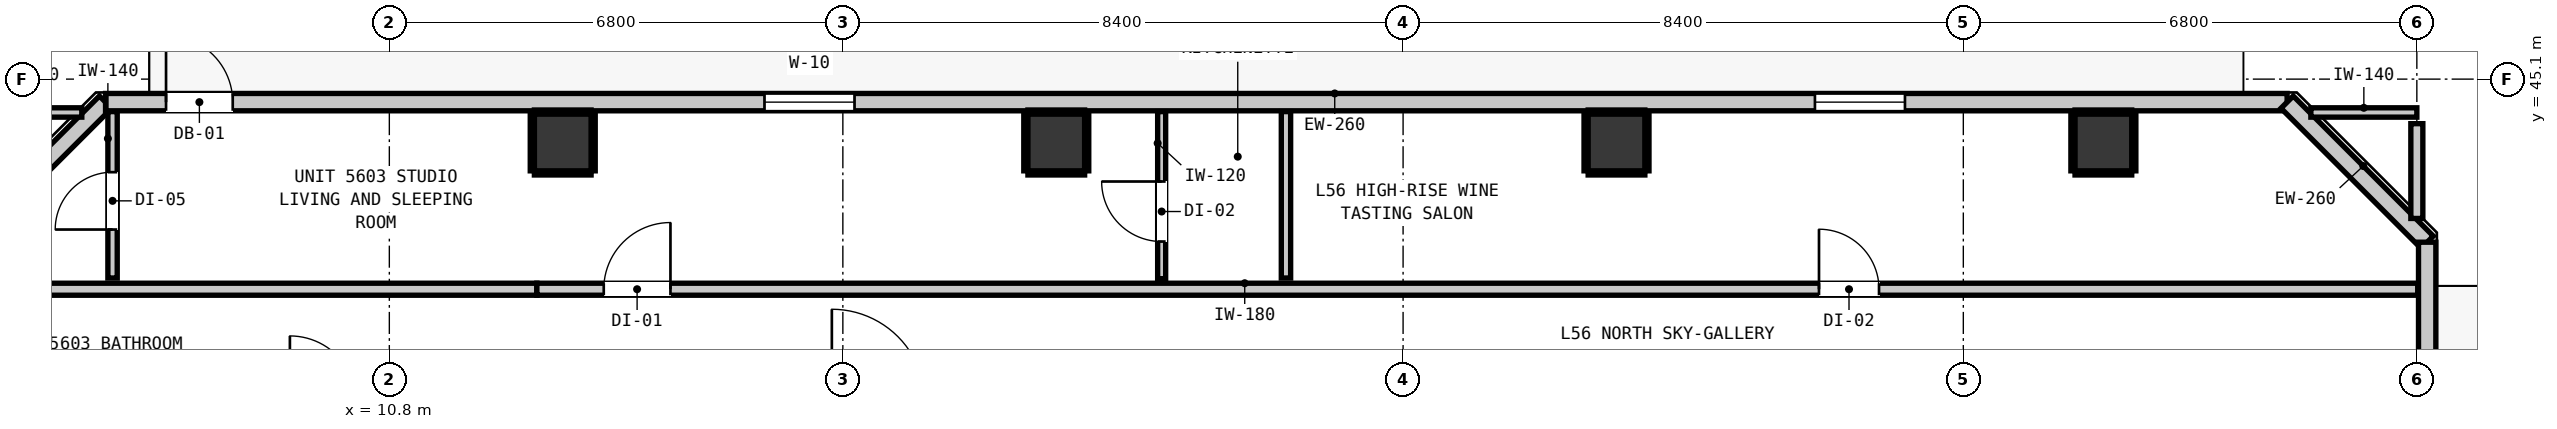
"""IFC4 building model, lengths in metres.
Left out: names, types, materials, properties, quantities, classifications, styles, units other than length and angle.
Written with IfcOpenShell. Run it as: python <this file> out.ifc"""

import sys

from ifc_helpers import new_model, si_unit, direction, frame, frame_2d, origin, origin_2d, place, context, subcontext, project, spatial, rectangle, extrude, element, fill, save


model = new_model("IFC4")
c1 = context("Model", 3, precision=1e-05, world=origin(), true_north=direction((0.0, 1.0)))
c2 = subcontext(c1, "Body", "Model", "MODEL_VIEW")
j1 = project(units=[si_unit("LENGTHUNIT", "METRE"), si_unit("PLANEANGLEUNIT", "RADIAN")], contexts=[c1])
p1 = place(None, origin())
s1 = spatial("IfcSite", under=j1, at=p1, CompositionType="ELEMENT")
p2 = place(p1, origin())
s2 = spatial("IfcBuilding", under=s1, at=p2, CompositionType="ELEMENT")
p3 = place(p2, frame((0.0, 0.0, 193.48)))
s3 = spatial("IfcBuildingStorey", under=s2, at=p3, CompositionType="ELEMENT", Elevation=193.48)
for number, where, z_axis, x_axis in (
    (1, (13.4, 44.15, 0.0), (0.0, 0.0, 1.0), (1.0, 0.0, 0.0)),
    (2, (20.8, 44.15, 0.0), (0.0, 0.0, 1.0), (1.0, 0.0, 0.0)),
    (3, (29.2, 44.15, 0.0), (0.0, 0.0, 1.0), (1.0, 0.0, 0.0)),
    (4, (36.5, 44.15, 0.0), (0.0, 0.0, 1.0), (1.0, 0.0, 0.0)),
):
    element("IfcColumn", number, at=place(p3, frame(where, z_axis=z_axis, x_axis=x_axis)), inside=s3, PredefinedType="COLUMN", context=c2, shape_type="SweptSolid", body=[
        extrude(rectangle(XDim=0.85, YDim=0.85, at=origin_2d()), origin(), (0.0, 0.0, 1.0), 3.32),
    ])
p4 = place(p3, frame((4.445, 42.655, 0.0), z_axis=(0.0, 0.0, 1.0), x_axis=(0.707106781187, 0.707106781187, 0.0)))
e5 = element("IfcWall", 5, at=p4, inside=s3, PredefinedType="STANDARD", context=c2, shape_type="SweptSolid", body=[
    extrude(rectangle(XDim=2.97, YDim=0.26, at=frame_2d((1.485, 0.0))), origin(), (0.0, 0.0, 1.0), 3.1),
])
p5 = place(p3, frame((6.545, 44.755, 0.0), z_axis=(0.0, 0.0, 1.0), x_axis=(1.0, 0.0, 0.0)))
e6 = element("IfcWall", 6, at=p5, inside=s3, PredefinedType="STANDARD", context=c2, shape_type="SweptSolid", body=[
    extrude(rectangle(XDim=32.71, YDim=0.26, at=frame_2d((16.355, 0.0))), origin(), (0.0, 0.0, 1.0), 3.1),
])
p6 = place(p5, frame((0.907, 0.0, 0.0)))
e7 = element("IfcOpeningElement", 7, at=p6, cuts=e6, PredefinedType="OPENING", context=c2, shape_type="SweptSolid", body=[
    extrude(rectangle(XDim=1.0, YDim=2.15, at=frame_2d((0.5, 1.075))), frame((0.0, 0.14, 0.0), z_axis=(0.0, -1.0, 0.0), x_axis=(1.0, 0.0, 0.0)), (0.0, 0.0, 1.0), 0.28),
])
p7 = place(p5, frame((9.88, 0.0, 0.85)))
e8 = element("IfcOpeningElement", 8, at=p7, cuts=e6, PredefinedType="OPENING", context=c2, shape_type="SweptSolid", body=[
    extrude(rectangle(XDim=1.35, YDim=1.85, at=frame_2d((0.675, 0.925))), frame((0.0, 0.14, 0.0), z_axis=(0.0, -1.0, 0.0), x_axis=(1.0, 0.0, 0.0)), (0.0, 0.0, 1.0), 0.28),
])
p8 = place(p5, frame((25.63, 0.0, 0.85)))
e9 = element("IfcOpeningElement", 9, at=p8, cuts=e6, PredefinedType="OPENING", context=c2, shape_type="SweptSolid", body=[
    extrude(rectangle(XDim=1.35, YDim=1.85, at=frame_2d((0.675, 0.925))), frame((0.0, 0.14, 0.0), z_axis=(0.0, -1.0, 0.0), x_axis=(1.0, 0.0, 0.0)), (0.0, 0.0, 1.0), 0.28),
])
p9 = place(p3, frame((39.255, 44.755, 0.0), z_axis=(0.0, 0.0, 1.0), x_axis=(0.707147883682, -0.707065676302, 0.0)))
e10 = element("IfcWall", 10, at=p9, inside=s3, PredefinedType="STANDARD", context=c2, shape_type="SweptSolid", body=[
    extrude(rectangle(XDim=2.97, YDim=0.26, at=frame_2d((1.485, 0.0))), origin(), (0.0, 0.0, 1.0), 3.1),
])
p10 = place(p3, frame((41.355, 42.655, 0.0), z_axis=(0.0, 0.0, 1.0), x_axis=(0.0, -1.0, 0.0)))
e11 = element("IfcWall", 11, at=p10, inside=s3, PredefinedType="STANDARD", context=c2, shape_type="SweptSolid", body=[
    extrude(rectangle(XDim=30.31, YDim=0.26, at=frame_2d((15.155, 0.0))), origin(), (0.0, 0.0, 1.0), 3.1),
])
p11 = place(p10, frame((23.818, 0.0, 0.0)))
e12 = element("IfcOpeningElement", 12, at=p11, cuts=e11, PredefinedType="OPENING", context=c2, shape_type="SweptSolid", body=[
    extrude(rectangle(XDim=1.0, YDim=2.15, at=frame_2d((0.5, 1.075))), frame((0.0, 0.14, 0.0), z_axis=(0.0, -1.0, 0.0), x_axis=(1.0, 0.0, 0.0)), (0.0, 0.0, 1.0), 0.28),
])
p12 = place(p10, frame((25.332, 0.0, 0.85)))
e13 = element("IfcOpeningElement", 13, at=p12, cuts=e11, PredefinedType="OPENING", context=c2, shape_type="SweptSolid", body=[
    extrude(rectangle(XDim=1.35, YDim=1.85, at=frame_2d((0.675, 0.925))), frame((0.0, 0.14, 0.0), z_axis=(0.0, -1.0, 0.0), x_axis=(1.0, 0.0, 0.0)), (0.0, 0.0, 1.0), 0.28),
])
p13 = place(p10, frame((28.033, 0.0, 0.85)))
e14 = element("IfcOpeningElement", 14, at=p13, cuts=e11, PredefinedType="OPENING", context=c2, shape_type="SweptSolid", body=[
    extrude(rectangle(XDim=1.35, YDim=1.85, at=frame_2d((0.675, 0.925))), frame((0.0, 0.14, 0.0), z_axis=(0.0, -1.0, 0.0), x_axis=(1.0, 0.0, 0.0)), (0.0, 0.0, 1.0), 0.28),
])
p14 = place(p3, frame((5.388, 41.95, 0.0), z_axis=(0.0, 0.0, 1.0), x_axis=(1.0, 0.0, 0.0)))
e15 = element("IfcWall", 15, at=p14, inside=s3, PredefinedType="PARTITIONING", context=c2, shape_type="SweptSolid", body=[
    extrude(rectangle(XDim=7.624, YDim=0.18, at=frame_2d((3.812, 0.0))), origin(), (0.0, 0.0, 1.0), 2.477),
])
p15 = place(p3, frame((13.012, 41.95, 0.0), z_axis=(0.0, 0.0, 1.0), x_axis=(1.0, 0.0, 0.0)))
e16 = element("IfcWall", 16, at=p15, inside=s3, PredefinedType="PARTITIONING", context=c2, shape_type="SweptSolid", body=[
    extrude(rectangle(XDim=28.201, YDim=0.18, at=frame_2d((14.101, 0.0))), origin(), (0.0, 0.0, 1.0), 3.1),
])
p16 = place(p15, frame((1.003, 0.0, 0.0)))
e17 = element("IfcOpeningElement", 17, at=p16, cuts=e16, PredefinedType="OPENING", context=c2, shape_type="SweptSolid", body=[
    extrude(rectangle(XDim=1.0, YDim=2.15, at=frame_2d((0.5, 1.075))), frame((0.0, 0.1, 0.0), z_axis=(0.0, -1.0, 0.0), x_axis=(1.0, 0.0, 0.0)), (0.0, 0.0, 1.0), 0.2),
])
p17 = place(p15, frame((19.224, 0.0, 0.0)))
e18 = element("IfcOpeningElement", 18, at=p17, cuts=e16, PredefinedType="OPENING", context=c2, shape_type="SweptSolid", body=[
    extrude(rectangle(XDim=0.9, YDim=2.1, at=frame_2d((0.45, 1.05))), frame((0.0, 0.1, 0.0), z_axis=(0.0, -1.0, 0.0), x_axis=(1.0, 0.0, 0.0)), (0.0, 0.0, 1.0), 0.2),
])
for number, where, z_axis, x_axis in (
    (19, (4.6, 44.6, 0.0), (0.0, 0.0, 1.0), (1.0, 0.0, 0.0)),
    (20, (39.611, 44.6, 0.0), (0.0, 0.0, 1.0), (1.0, 0.0, 0.0)),
):
    element("IfcWall", number, at=place(p3, frame(where, z_axis=z_axis, x_axis=x_axis)), inside=s3, PredefinedType="PARTITIONING", context=c2, shape_type="SweptSolid", body=[
        extrude(rectangle(XDim=1.589, YDim=0.14, at=frame_2d((0.794, 0.0))), origin(), (0.0, 0.0, 1.0), 3.1),
    ])
p18 = place(p3, frame((41.2, 43.011, 0.0), z_axis=(0.0, 0.0, 1.0), x_axis=(0.0, 1.0, 0.0)))
e21 = element("IfcWall", 21, at=p18, inside=s3, PredefinedType="PARTITIONING", context=c2, shape_type="SweptSolid", body=[
    extrude(rectangle(XDim=1.421, YDim=0.18, at=frame_2d((0.71, 0.0))), origin(), (0.0, 0.0, 1.0), 3.1),
])
p19 = place(p3, frame((6.65, 42.118, 0.0), z_axis=(0.0, 0.0, 1.0), x_axis=(0.0, 1.0, 0.0)))
e22 = element("IfcWall", 22, at=p19, inside=s3, PredefinedType="PARTITIONING", context=c2, shape_type="SweptSolid", body=[
    extrude(rectangle(XDim=2.495, YDim=0.14, at=frame_2d((1.248, 0.0))), origin(), (0.0, 0.0, 1.0), 3.1),
])
p20 = place(p19, frame((0.727, 0.0, 0.0)))
e23 = element("IfcOpeningElement", 23, at=p20, cuts=e22, PredefinedType="OPENING", context=c2, shape_type="SweptSolid", body=[
    extrude(rectangle(XDim=0.86, YDim=2.02, at=frame_2d((0.43, 1.01))), frame((0.0, 0.08, 0.0), z_axis=(0.0, -1.0, 0.0), x_axis=(1.0, 0.0, 0.0)), (0.0, 0.0, 1.0), 0.16),
])
p21 = place(p3, frame((24.244, 42.118, 0.0), z_axis=(0.0, 0.0, 1.0), x_axis=(0.0, 1.0, 0.0)))
e24 = element("IfcWall", 24, at=p21, inside=s3, PredefinedType="PARTITIONING", context=c2, shape_type="SweptSolid", body=[
    extrude(rectangle(XDim=2.495, YDim=0.14, at=frame_2d((1.248, 0.0))), origin(), (0.0, 0.0, 1.0), 3.1),
])
p22 = place(p3, frame((22.38, 42.108, 0.0), z_axis=(0.0, 0.0, 1.0), x_axis=(0.0, 1.0, 0.0)))
e25 = element("IfcWall", 25, at=p22, inside=s3, PredefinedType="PARTITIONING", context=c2, shape_type="SweptSolid", body=[
    extrude(rectangle(XDim=2.505, YDim=0.12, at=frame_2d((1.252, 0.0))), origin(), (0.0, 0.0, 1.0), 3.1),
])
p23 = place(p22, frame((0.557, 0.0, 0.0)))
e26 = element("IfcOpeningElement", 26, at=p23, cuts=e25, PredefinedType="OPENING", context=c2, shape_type="SweptSolid", body=[
    extrude(rectangle(XDim=0.9, YDim=2.1, at=frame_2d((0.45, 1.05))), frame((0.0, 0.07, 0.0), z_axis=(0.0, -1.0, 0.0), x_axis=(1.0, 0.0, 0.0)), (0.0, 0.0, 1.0), 0.14),
])
for number, where, z_axis, x_axis in (
    (27, (12.975, 43.693, 0.0), (0.0, 0.0, 1.0), (1.0, 0.0, 0.0)),
    (28, (12.975, 44.607, 0.0), (0.0, 0.0, 1.0), (1.0, 0.0, 0.0)),
    (29, (12.943, 43.725, 0.0), (0.0, 0.0, 1.0), (0.0, 1.0, 0.0)),
    (30, (13.857, 43.725, 0.0), (0.0, 0.0, 1.0), (0.0, 1.0, 0.0)),
):
    element("IfcWall", number, at=place(p3, frame(where, z_axis=z_axis, x_axis=x_axis)), inside=s3, PredefinedType="PARTITIONING", context=c2, shape_type="SweptSolid", body=[
        extrude(rectangle(XDim=0.85, YDim=0.06, at=frame_2d((0.425, 0.0))), origin(), (0.0, 0.0, 1.0), 1.45),
    ])
for number, where, z_axis, x_axis in (
    (31, (20.375, 43.693, 0.0), (0.0, 0.0, 1.0), (1.0, 0.0, 0.0)),
    (32, (20.375, 44.607, 0.0), (0.0, 0.0, 1.0), (1.0, 0.0, 0.0)),
):
    element("IfcWall", number, at=place(p3, frame(where, z_axis=z_axis, x_axis=x_axis)), inside=s3, PredefinedType="PARTITIONING", context=c2, shape_type="SweptSolid", body=[
        extrude(rectangle(XDim=0.85, YDim=0.06, at=frame_2d((0.425, 0.0))), origin(), (0.0, 0.0, 1.0), 1.45),
    ])
for number, where, z_axis, x_axis in (
    (33, (20.343, 43.725, 0.0), (0.0, 0.0, 1.0), (0.0, 1.0, 0.0)),
    (34, (21.257, 43.725, 0.0), (0.0, 0.0, 1.0), (0.0, 1.0, 0.0)),
):
    element("IfcWall", number, at=place(p3, frame(where, z_axis=z_axis, x_axis=x_axis)), inside=s3, PredefinedType="PARTITIONING", context=c2, shape_type="SweptSolid", body=[
        extrude(rectangle(XDim=0.85, YDim=0.06, at=frame_2d((0.425, 0.0))), origin(), (0.0, 0.0, 1.0), 1.45),
    ])
for number, where, z_axis, x_axis in (
    (35, (28.775, 43.693, 0.0), (0.0, 0.0, 1.0), (1.0, 0.0, 0.0)),
    (36, (28.775, 44.607, 0.0), (0.0, 0.0, 1.0), (1.0, 0.0, 0.0)),
):
    element("IfcWall", number, at=place(p3, frame(where, z_axis=z_axis, x_axis=x_axis)), inside=s3, PredefinedType="PARTITIONING", context=c2, shape_type="SweptSolid", body=[
        extrude(rectangle(XDim=0.85, YDim=0.06, at=frame_2d((0.425, 0.0))), origin(), (0.0, 0.0, 1.0), 1.45),
    ])
for number, where, z_axis, x_axis in (
    (37, (28.743, 43.725, 0.0), (0.0, 0.0, 1.0), (0.0, 1.0, 0.0)),
    (38, (29.657, 43.725, 0.0), (0.0, 0.0, 1.0), (0.0, 1.0, 0.0)),
):
    element("IfcWall", number, at=place(p3, frame(where, z_axis=z_axis, x_axis=x_axis)), inside=s3, PredefinedType="PARTITIONING", context=c2, shape_type="SweptSolid", body=[
        extrude(rectangle(XDim=0.85, YDim=0.06, at=frame_2d((0.425, 0.0))), origin(), (0.0, 0.0, 1.0), 1.45),
    ])
for number, where, z_axis, x_axis in (
    (39, (36.075, 43.693, 0.0), (0.0, 0.0, 1.0), (1.0, 0.0, 0.0)),
    (40, (36.075, 44.607, 0.0), (0.0, 0.0, 1.0), (1.0, 0.0, 0.0)),
):
    element("IfcWall", number, at=place(p3, frame(where, z_axis=z_axis, x_axis=x_axis)), inside=s3, PredefinedType="PARTITIONING", context=c2, shape_type="SweptSolid", body=[
        extrude(rectangle(XDim=0.85, YDim=0.06, at=frame_2d((0.425, 0.0))), origin(), (0.0, 0.0, 1.0), 1.45),
    ])
for number, where, z_axis, x_axis in (
    (41, (36.043, 43.725, 0.0), (0.0, 0.0, 1.0), (0.0, 1.0, 0.0)),
    (42, (36.957, 43.725, 0.0), (0.0, 0.0, 1.0), (0.0, 1.0, 0.0)),
):
    element("IfcWall", number, at=place(p3, frame(where, z_axis=z_axis, x_axis=x_axis)), inside=s3, PredefinedType="PARTITIONING", context=c2, shape_type="SweptSolid", body=[
        extrude(rectangle(XDim=0.85, YDim=0.06, at=frame_2d((0.425, 0.0))), origin(), (0.0, 0.0, 1.0), 1.45),
    ])
p24 = place(p6, origin())
e43 = element("IfcDoor", 43, at=p24, inside=s3, OperationType="SINGLE_SWING_LEFT", PredefinedType="DOOR", context=c2, shape_type="SweptSolid", body=[
    extrude(rectangle(XDim=1.0, YDim=2.15, at=frame_2d((0.5, 1.075))), frame((0.0, 0.025, 0.0), z_axis=(0.0, -1.0, 0.0), x_axis=(1.0, 0.0, 0.0)), (0.0, 0.0, 1.0), 0.05),
])
fill(e7, e43)
p25 = place(p7, origin())
e44 = element("IfcWindow", 44, at=p25, inside=s3, PartitioningType="SINGLE_PANEL", PredefinedType="WINDOW", context=c2, shape_type="SweptSolid", body=[
    extrude(rectangle(XDim=1.35, YDim=1.85, at=frame_2d((0.675, 0.925))), frame((0.0, 0.03, 0.0), z_axis=(0.0, -1.0, 0.0), x_axis=(1.0, 0.0, 0.0)), (0.0, 0.0, 1.0), 0.06),
])
fill(e8, e44)
p26 = place(p8, origin())
e45 = element("IfcWindow", 45, at=p26, inside=s3, PartitioningType="SINGLE_PANEL", PredefinedType="WINDOW", context=c2, shape_type="SweptSolid", body=[
    extrude(rectangle(XDim=1.35, YDim=1.85, at=frame_2d((0.675, 0.925))), frame((0.0, 0.03, 0.0), z_axis=(0.0, -1.0, 0.0), x_axis=(1.0, 0.0, 0.0)), (0.0, 0.0, 1.0), 0.06),
])
fill(e9, e45)
p27 = place(p16, origin())
e46 = element("IfcDoor", 46, at=p27, inside=s3, OperationType="SINGLE_SWING_RIGHT", PredefinedType="DOOR", context=c2, shape_type="SweptSolid", body=[
    extrude(rectangle(XDim=1.0, YDim=2.15, at=frame_2d((0.5, 1.075))), frame((0.0, 0.025, 0.0), z_axis=(0.0, -1.0, 0.0), x_axis=(1.0, 0.0, 0.0)), (0.0, 0.0, 1.0), 0.05),
])
fill(e17, e46)
p28 = place(p20, origin())
e47 = element("IfcDoor", 47, at=p28, inside=s3, OperationType="SINGLE_SWING_LEFT", PredefinedType="DOOR", context=c2, shape_type="SweptSolid", body=[
    extrude(rectangle(XDim=0.86, YDim=2.02, at=frame_2d((0.43, 1.01))), frame((0.0, 0.025, 0.0), z_axis=(0.0, -1.0, 0.0), x_axis=(1.0, 0.0, 0.0)), (0.0, 0.0, 1.0), 0.05),
])
fill(e23, e47)
p29 = place(p23, origin())
e48 = element("IfcDoor", 48, at=p29, inside=s3, OperationType="SINGLE_SWING_RIGHT", PredefinedType="DOOR", context=c2, shape_type="SweptSolid", body=[
    extrude(rectangle(XDim=0.9, YDim=2.1, at=frame_2d((0.45, 1.05))), frame((0.0, 0.025, 0.0), z_axis=(0.0, -1.0, 0.0), x_axis=(1.0, 0.0, 0.0)), (0.0, 0.0, 1.0), 0.05),
])
fill(e26, e48)
p30 = place(p17, origin())
e49 = element("IfcDoor", 49, at=p30, inside=s3, OperationType="SINGLE_SWING_LEFT", PredefinedType="DOOR", context=c2, shape_type="SweptSolid", body=[
    extrude(rectangle(XDim=0.9, YDim=2.1, at=frame_2d((0.45, 1.05))), frame((0.0, 0.025, 0.0), z_axis=(0.0, -1.0, 0.0), x_axis=(1.0, 0.0, 0.0)), (0.0, 0.0, 1.0), 0.05),
])
fill(e18, e49)
save(model, sys.argv[1])
